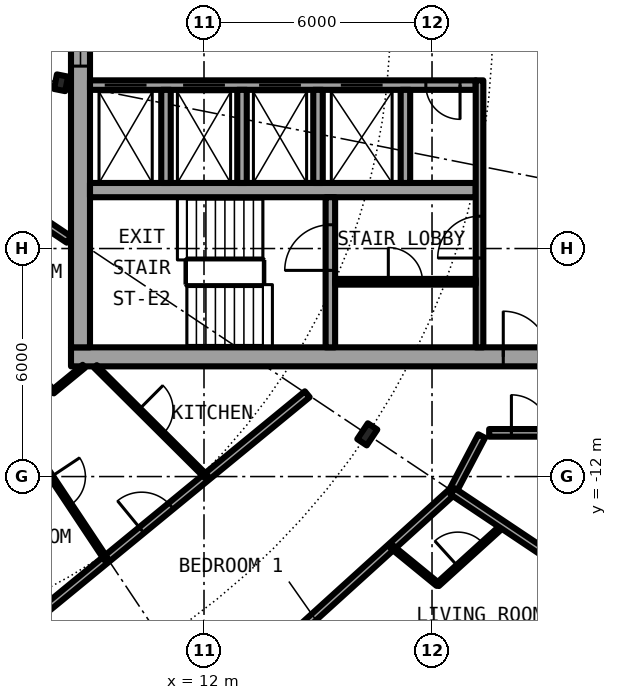
"""IFC4 building model, lengths in metres.
Left out: names, types, materials, properties, quantities, classifications, styles, units other than length and angle.
Written with IfcOpenShell. Run it as: python <this file> out.ifc"""

import sys

from ifc_helpers import new_model, si_unit, direction, frame, frame_2d, origin, origin_2d, place, context, subcontext, project, spatial, rectangle, i_section, extrude, element, fill, save


model = new_model("IFC4")
c1 = context("Model", 3, precision=1e-05, world=origin(), true_north=direction((0.0, 1.0)))
c2 = subcontext(c1, "Body", "Model", "MODEL_VIEW")
j1 = project(units=[si_unit("LENGTHUNIT", "METRE"), si_unit("PLANEANGLEUNIT", "RADIAN")], contexts=[c1])
p1 = place(None, origin())
s1 = spatial("IfcSite", under=j1, at=p1, CompositionType="ELEMENT")
p2 = place(p1, origin())
s2 = spatial("IfcBuilding", under=s1, at=p2, CompositionType="ELEMENT")
p3 = place(p2, frame((0.0, 0.0, 161.6)))
s3 = spatial("IfcBuildingStorey", under=s2, at=p3, CompositionType="ELEMENT", Elevation=161.6)
p4 = place(p3, frame((16.297, -10.889, 0.0), z_axis=(0.0, 0.0, 1.0), x_axis=(0.831469612303, -0.55557023302, 0.0)))
e1 = element("IfcColumn", 1, at=p4, inside=s3, PredefinedType="COLUMN", context=c2, shape_type="SweptSolid", body=[
    extrude(i_section(OverallWidth=0.3, OverallDepth=0.5, WebThickness=0.014, FlangeThickness=0.028, FilletRadius=0.027, at=origin_2d()), origin(), (0.0, 0.0, 1.0), 3.05),
])
p5 = place(p3, frame((8.239, -1.639, 0.0), z_axis=(0.0, 0.0, 1.0), x_axis=(0.980785280403, -0.195090322016, 0.0)))
e2 = element("IfcColumn", 2, at=p5, inside=s3, PredefinedType="COLUMN", context=c2, shape_type="SweptSolid", body=[
    extrude(i_section(OverallWidth=0.3, OverallDepth=0.39, WebThickness=0.011, FlangeThickness=0.019, FilletRadius=0.027, at=origin_2d()), origin(), (0.0, 0.0, 1.0), 3.05),
])
p6 = place(p3, frame((19.304, -19.304, 0.0), z_axis=(0.0, 0.0, 1.0), x_axis=(0.634382322723, 0.773019449054, 0.0)))
e3 = element("IfcWall", 3, at=p6, inside=s3, PredefinedType="SOLIDWALL", context=c2, shape_type="SweptSolid", body=[
    extrude(rectangle(XDim=5.352, YDim=0.25, at=frame_2d((2.676, 0.0))), origin(), (0.0, 0.0, 1.0), 2.7),
])
p7 = place(p6, frame((0.441, 0.0, 0.3)))
e4 = element("IfcOpeningElement", 4, at=p7, cuts=e3, PredefinedType="OPENING", context=c2, shape_type="SweptSolid", body=[
    extrude(rectangle(XDim=1.8, YDim=2.1, at=frame_2d((0.9, 1.05))), frame((0.0, 0.135, 0.0), z_axis=(0.0, -1.0, 0.0), x_axis=(1.0, 0.0, 0.0)), (0.0, 0.0, 1.0), 0.27),
])
p8 = place(p6, frame((3.51, 0.0, 0.0)))
e5 = element("IfcOpeningElement", 5, at=p8, cuts=e3, PredefinedType="OPENING", context=c2, shape_type="SweptSolid", body=[
    extrude(rectangle(XDim=1.0, YDim=2.2, at=frame_2d((0.5, 1.1))), frame((0.0, 0.135, 0.0), z_axis=(0.0, -1.0, 0.0), x_axis=(1.0, 0.0, 0.0)), (0.0, 0.0, 1.0), 0.27),
])
p9 = place(p3, frame((8.5, -8.85, 0.0), z_axis=(0.0, 0.0, 1.0), x_axis=(1.0, 0.0, 0.0)))
e6 = element("IfcWall", 6, at=p9, inside=s3, PredefinedType="SHEAR", context=c2, shape_type="SweptSolid", body=[
    extrude(rectangle(XDim=13.6, YDim=0.5, at=frame_2d((6.8, 0.0))), origin(), (0.0, 0.0, 1.0), 3.05),
])
p10 = place(p9, frame((11.375, 0.0, 0.0)))
e7 = element("IfcOpeningElement", 7, at=p10, cuts=e6, PredefinedType="OPENING", context=c2, shape_type="SweptSolid", body=[
    extrude(rectangle(XDim=1.2, YDim=2.3, at=frame_2d((0.6, 1.15))), frame((0.0, 0.26, 0.0), z_axis=(0.0, -1.0, 0.0), x_axis=(1.0, 0.0, 0.0)), (0.0, 0.0, 1.0), 0.52),
])
p11 = place(p3, frame((8.75, -8.6, 0.0), z_axis=(0.0, 0.0, 1.0), x_axis=(0.0, 1.0, 0.0)))
e8 = element("IfcWall", 8, at=p11, inside=s3, PredefinedType="SHEAR", context=c2, shape_type="SweptSolid", body=[
    extrude(rectangle(XDim=17.2, YDim=0.5, at=frame_2d((8.6, 0.0))), origin(), (0.0, 0.0, 1.0), 3.05),
])
p12 = place(p11, frame((7.4, 0.0, 0.1)))
e9 = element("IfcOpeningElement", 9, at=p12, cuts=e8, PredefinedType="OPENING", context=c2, shape_type="SweptSolid", body=[
    extrude(rectangle(XDim=2.4, YDim=2.2, at=frame_2d((1.2, 1.1))), frame((0.0, 0.26, 0.0), z_axis=(0.0, -1.0, 0.0), x_axis=(1.0, 0.0, 0.0)), (0.0, 0.0, 1.0), 0.52),
])
p13 = place(p3, frame((19.15, -1.7, 0.0), z_axis=(0.0, 0.0, 1.0), x_axis=(-1.0, 0.0, 0.0)))
e10 = element("IfcWall", 10, at=p13, inside=s3, PredefinedType="SHEAR", context=c2, shape_type="SweptSolid", body=[
    extrude(rectangle(XDim=10.15, YDim=0.25, at=frame_2d((5.075, 0.0))), origin(), (0.0, 0.0, 1.0), 3.05),
])
p14 = place(p13, frame((8.663, 0.0, 0.0)))
e11 = element("IfcOpeningElement", 11, at=p14, cuts=e10, PredefinedType="OPENING", context=c2, shape_type="SweptSolid", body=[
    extrude(rectangle(XDim=1.1, YDim=2.3, at=frame_2d((0.55, 1.15))), frame((0.0, 0.135, 0.0), z_axis=(0.0, -1.0, 0.0), x_axis=(1.0, 0.0, 0.0)), (0.0, 0.0, 1.0), 0.27),
])
p15 = place(p13, frame((6.6, 0.0, 0.0)))
e12 = element("IfcOpeningElement", 12, at=p15, cuts=e10, PredefinedType="OPENING", context=c2, shape_type="SweptSolid", body=[
    extrude(rectangle(XDim=1.1, YDim=2.3, at=frame_2d((0.55, 1.15))), frame((0.0, 0.135, 0.0), z_axis=(0.0, -1.0, 0.0), x_axis=(1.0, 0.0, 0.0)), (0.0, 0.0, 1.0), 0.27),
])
p16 = place(p13, frame((4.6, 0.0, 0.0)))
e13 = element("IfcOpeningElement", 13, at=p16, cuts=e10, PredefinedType="OPENING", context=c2, shape_type="SweptSolid", body=[
    extrude(rectangle(XDim=1.1, YDim=2.3, at=frame_2d((0.55, 1.15))), frame((0.0, 0.135, 0.0), z_axis=(0.0, -1.0, 0.0), x_axis=(1.0, 0.0, 0.0)), (0.0, 0.0, 1.0), 0.27),
])
p17 = place(p13, frame((2.45, 0.0, 0.0)))
e14 = element("IfcOpeningElement", 14, at=p17, cuts=e10, PredefinedType="OPENING", context=c2, shape_type="SweptSolid", body=[
    extrude(rectangle(XDim=1.1, YDim=2.3, at=frame_2d((0.55, 1.15))), frame((0.0, 0.135, 0.0), z_axis=(0.0, -1.0, 0.0), x_axis=(1.0, 0.0, 0.0)), (0.0, 0.0, 1.0), 0.27),
])
p18 = place(p13, frame((0.413, 0.0, 0.0)))
e15 = element("IfcOpeningElement", 15, at=p18, cuts=e10, PredefinedType="OPENING", context=c2, shape_type="SweptSolid", body=[
    extrude(rectangle(XDim=0.9, YDim=2.3, at=frame_2d((0.45, 1.15))), frame((0.0, 0.135, 0.0), z_axis=(0.0, -1.0, 0.0), x_axis=(1.0, 0.0, 0.0)), (0.0, 0.0, 1.0), 0.27),
])
p19 = place(p3, frame((9.0, -4.462, 0.0), z_axis=(0.0, 0.0, 1.0), x_axis=(1.0, 0.0, 0.0)))
e16 = element("IfcWall", 16, at=p19, inside=s3, PredefinedType="SHEAR", context=c2, shape_type="SweptSolid", body=[
    extrude(rectangle(XDim=10.15, YDim=0.375, at=frame_2d((5.075, 0.0))), origin(), (0.0, 0.0, 1.0), 3.05),
])
p20 = place(p3, frame((15.325, -8.6, 0.0), z_axis=(0.0, 0.0, 1.0), x_axis=(0.0, 1.0, 0.0)))
e17 = element("IfcWall", 17, at=p20, inside=s3, PredefinedType="SHEAR", context=c2, shape_type="SweptSolid", body=[
    extrude(rectangle(XDim=3.95, YDim=0.25, at=frame_2d((1.975, 0.0))), origin(), (0.0, 0.0, 1.0), 3.05),
])
p21 = place(p20, frame((2.025, 0.0, 0.0)))
e18 = element("IfcOpeningElement", 18, at=p21, cuts=e17, PredefinedType="OPENING", context=c2, shape_type="SweptSolid", body=[
    extrude(rectangle(XDim=1.2, YDim=2.3, at=frame_2d((0.6, 1.15))), frame((0.0, 0.135, 0.0), z_axis=(0.0, -1.0, 0.0), x_axis=(1.0, 0.0, 0.0)), (0.0, 0.0, 1.0), 0.27),
])
for number, where, z_axis, x_axis in (
    (19, (15.0, -1.825, 0.0), (0.0, 0.0, 1.0), (0.0, -1.0, 0.0)),
    (20, (17.3, -1.825, 0.0), (0.0, 0.0, 1.0), (0.0, -1.0, 0.0)),
):
    element("IfcWall", number, at=place(p3, frame(where, z_axis=z_axis, x_axis=x_axis)), inside=s3, PredefinedType="SOLIDWALL", context=c2, shape_type="SweptSolid", body=[
        extrude(rectangle(XDim=2.45, YDim=0.25, at=frame_2d((1.225, 0.0))), origin(), (0.0, 0.0, 1.0), 2.7),
    ])
p22 = place(p3, frame((19.25, -8.6, 0.0), z_axis=(0.0, 0.0, 1.0), x_axis=(0.0, 1.0, 0.0)))
e21 = element("IfcWall", 21, at=p22, inside=s3, PredefinedType="SOLIDWALL", context=c2, shape_type="SweptSolid", body=[
    extrude(rectangle(XDim=7.025, YDim=0.2, at=frame_2d((3.513, 0.0))), origin(), (0.0, 0.0, 1.0), 2.7),
])
p23 = place(p22, frame((2.35, 0.0, 0.0)))
e22 = element("IfcOpeningElement", 22, at=p23, cuts=e21, PredefinedType="OPENING", context=c2, shape_type="SweptSolid", body=[
    extrude(rectangle(XDim=1.1, YDim=2.3, at=frame_2d((0.55, 1.15))), frame((0.0, 0.11, 0.0), z_axis=(0.0, -1.0, 0.0), x_axis=(1.0, 0.0, 0.0)), (0.0, 0.0, 1.0), 0.22),
])
for number, where, z_axis, x_axis in (
    (23, (11.0, -1.825, 0.0), (0.0, 0.0, 1.0), (0.0, -1.0, 0.0)),
    (24, (13.0, -1.825, 0.0), (0.0, 0.0, 1.0), (0.0, -1.0, 0.0)),
):
    element("IfcWall", number, at=place(p3, frame(where, z_axis=z_axis, x_axis=x_axis)), inside=s3, PredefinedType="SOLIDWALL", context=c2, shape_type="SweptSolid", body=[
        extrude(rectangle(XDim=2.45, YDim=0.25, at=frame_2d((1.225, 0.0))), origin(), (0.0, 0.0, 1.0), 2.7),
    ])
p24 = place(p3, frame((15.45, -6.875, 0.0), z_axis=(0.0, 0.0, 1.0), x_axis=(1.0, 0.0, 0.0)))
e25 = element("IfcWall", 25, at=p24, inside=s3, PredefinedType="PARTITIONING", context=c2, shape_type="SweptSolid", body=[
    extrude(rectangle(XDim=3.7, YDim=0.15, at=frame_2d((1.85, 0.0))), origin(), (0.0, 0.0, 1.0), 2.7),
])
p25 = place(p24, frame((1.4, 0.0, 0.0)))
e26 = element("IfcOpeningElement", 26, at=p25, cuts=e25, PredefinedType="OPENING", context=c2, shape_type="SweptSolid", body=[
    extrude(rectangle(XDim=0.9, YDim=2.3, at=frame_2d((0.45, 1.15))), frame((0.0, 0.085, 0.0), z_axis=(0.0, -1.0, 0.0), x_axis=(1.0, 0.0, 0.0)), (0.0, 0.0, 1.0), 0.17),
])
p26 = place(p3, frame((18.147, -14.844, 0.0), z_axis=(0.0, 0.0, 1.0), x_axis=(0.741080073381, 0.671416655169, 0.0)))
e27 = element("IfcWall", 27, at=p26, inside=s3, PredefinedType="PARTITIONING", context=c2, shape_type="SweptSolid", body=[
    extrude(rectangle(XDim=2.323, YDim=0.1, at=frame_2d((1.162, 0.0))), origin(), (0.0, 0.0, 1.0), 2.7),
])
p27 = place(p26, frame((0.718, 0.0, 0.0)))
e28 = element("IfcOpeningElement", 28, at=p27, cuts=e27, PredefinedType="OPENING", context=c2, shape_type="SweptSolid", body=[
    extrude(rectangle(XDim=0.9, YDim=2.3, at=frame_2d((0.45, 1.15))), frame((0.0, 0.06, 0.0), z_axis=(0.0, -1.0, 0.0), x_axis=(1.0, 0.0, 0.0)), (0.0, 0.0, 1.0), 0.12),
])
p28 = place(p3, frame((18.542, -12.389, 0.0), z_axis=(0.0, 0.0, 1.0), x_axis=(0.465605550524, 0.884992356646, 0.0)))
e29 = element("IfcWall", 29, at=p28, inside=s3, PredefinedType="PARTITIONING", context=c2, shape_type="SweptSolid", body=[
    extrude(rectangle(XDim=1.643, YDim=0.2, at=frame_2d((0.821, 0.0))), origin(), (0.0, 0.0, 1.0), 2.7),
])
p29 = place(p3, frame((10.512, -19.667, 0.0), z_axis=(0.0, 0.0, 1.0), x_axis=(0.740947367223, 0.671563101283, 0.0)))
e30 = element("IfcWall", 30, at=p29, inside=s3, PredefinedType="PARTITIONING", context=c2, shape_type="SweptSolid", body=[
    extrude(rectangle(XDim=10.837, YDim=0.2, at=frame_2d((5.419, 0.0))), origin(), (0.0, 0.0, 1.0), 2.7),
])
p30 = place(p29, frame((3.835, 0.0, 0.0)))
e31 = element("IfcOpeningElement", 31, at=p30, cuts=e30, PredefinedType="OPENING", context=c2, shape_type="SweptSolid", body=[
    extrude(rectangle(XDim=1.0, YDim=2.3, at=frame_2d((0.5, 1.15))), frame((0.0, 0.11, 0.0), z_axis=(0.0, -1.0, 0.0), x_axis=(1.0, 0.0, 0.0)), (0.0, 0.0, 1.0), 0.22),
])
p31 = place(p3, frame((6.773, -16.353, 0.0), z_axis=(0.0, 0.0, 1.0), x_axis=(0.773034536097, 0.634363938131, 0.0)))
e32 = element("IfcWall", 32, at=p31, inside=s3, PredefinedType="PARTITIONING", context=c2, shape_type="SweptSolid", body=[
    extrude(rectangle(XDim=10.277, YDim=0.2, at=frame_2d((5.138, 0.0))), origin(), (0.0, 0.0, 1.0), 2.7),
])
p32 = place(p31, frame((4.638, 0.0, 0.0)))
e33 = element("IfcOpeningElement", 33, at=p32, cuts=e32, PredefinedType="OPENING", context=c2, shape_type="SweptSolid", body=[
    extrude(rectangle(XDim=1.0, YDim=2.3, at=frame_2d((0.5, 1.15))), frame((0.0, 0.11, 0.0), z_axis=(0.0, -1.0, 0.0), x_axis=(1.0, 0.0, 0.0)), (0.0, 0.0, 1.0), 0.22),
])
p33 = place(p3, frame((8.016, -9.773, 0.0), z_axis=(0.0, 0.0, 1.0), x_axis=(0.7731800648, 0.634186555673, 0.0)))
e34 = element("IfcWall", 34, at=p33, inside=s3, PredefinedType="PARTITIONING", context=c2, shape_type="SweptSolid", body=[
    extrude(rectangle(XDim=1.064, YDim=0.1, at=frame_2d((0.532, 0.0))), origin(), (0.0, 0.0, 1.0), 2.7),
])
p34 = place(p3, frame((19.504, -10.85, 0.0), z_axis=(0.0, 0.0, 1.0), x_axis=(1.0, 0.0, 0.0)))
e35 = element("IfcWall", 35, at=p34, inside=s3, PredefinedType="PARTITIONING", context=c2, shape_type="SweptSolid", body=[
    extrude(rectangle(XDim=2.171, YDim=0.2, at=frame_2d((1.085, 0.0))), origin(), (0.0, 0.0, 1.0), 2.7),
])
p35 = place(p34, frame((0.585, 0.0, 0.0)))
e36 = element("IfcOpeningElement", 36, at=p35, cuts=e35, PredefinedType="OPENING", context=c2, shape_type="SweptSolid", body=[
    extrude(rectangle(XDim=1.0, YDim=2.3, at=frame_2d((0.5, 1.15))), frame((0.0, 0.11, 0.0), z_axis=(0.0, -1.0, 0.0), x_axis=(1.0, 0.0, 0.0)), (0.0, 0.0, 1.0), 0.22),
])
p36 = place(p3, frame((6.513, -4.472, 0.0), z_axis=(0.0, 0.0, 1.0), x_axis=(0.83133816625, -0.555766905579, 0.0)))
e37 = element("IfcWall", 37, at=p36, inside=s3, PredefinedType="PARTITIONING", context=c2, shape_type="SweptSolid", body=[
    extrude(rectangle(XDim=2.323, YDim=0.2, at=frame_2d((1.162, 0.0))), origin(), (0.0, 0.0, 1.0), 2.7),
])
p37 = place(p3, frame((4.898, -5.968, 0.0), z_axis=(0.0, 0.0, 1.0), x_axis=(0.634401778971, -0.773003481776, 0.0)))
e38 = element("IfcWall", 38, at=p37, inside=s3, PredefinedType="PARTITIONING", context=c2, shape_type="SweptSolid", body=[
    extrude(rectangle(XDim=4.92, YDim=0.1, at=frame_2d((2.46, 0.0))), origin(), (0.0, 0.0, 1.0), 2.7),
])
p38 = place(p37, frame((2.01, 0.0, 0.0)))
e39 = element("IfcOpeningElement", 39, at=p38, cuts=e38, PredefinedType="OPENING", context=c2, shape_type="SweptSolid", body=[
    extrude(rectangle(XDim=0.9, YDim=2.3, at=frame_2d((0.45, 1.15))), frame((0.0, 0.06, 0.0), z_axis=(0.0, -1.0, 0.0), x_axis=(1.0, 0.0, 0.0)), (0.0, 0.0, 1.0), 0.12),
])
p39 = place(p3, frame((7.033, -10.581, 0.0), z_axis=(0.0, 0.0, 1.0), x_axis=(0.553865036342, -0.832606462573, 0.0)))
e40 = element("IfcWall", 40, at=p39, inside=s3, PredefinedType="PARTITIONING", context=c2, shape_type="SweptSolid", body=[
    extrude(rectangle(XDim=4.319, YDim=0.1, at=frame_2d((2.159, 0.0))), origin(), (0.0, 0.0, 1.0), 2.7),
])
p40 = place(p39, frame((1.709, 0.0, 0.0)))
e41 = element("IfcOpeningElement", 41, at=p40, cuts=e40, PredefinedType="OPENING", context=c2, shape_type="SweptSolid", body=[
    extrude(rectangle(XDim=0.9, YDim=2.3, at=frame_2d((0.45, 1.15))), frame((0.0, 0.06, 0.0), z_axis=(0.0, -1.0, 0.0), x_axis=(1.0, 0.0, 0.0)), (0.0, 0.0, 1.0), 0.12),
])
p41 = place(p3, frame((9.144, -9.104, 0.0), z_axis=(0.0, 0.0, 1.0), x_axis=(0.708793214553, -0.705416316088, 0.0)))
e42 = element("IfcWall", 42, at=p41, inside=s3, PredefinedType="PARTITIONING", context=c2, shape_type="SweptSolid", body=[
    extrude(rectangle(XDim=4.121, YDim=0.1, at=frame_2d((2.061, 0.0))), origin(), (0.0, 0.0, 1.0), 2.7),
])
p42 = place(p41, frame((1.611, 0.0, 0.0)))
e43 = element("IfcOpeningElement", 43, at=p42, cuts=e42, PredefinedType="OPENING", context=c2, shape_type="SweptSolid", body=[
    extrude(rectangle(XDim=0.9, YDim=2.3, at=frame_2d((0.45, 1.15))), frame((0.0, 0.06, 0.0), z_axis=(0.0, -1.0, 0.0), x_axis=(1.0, 0.0, 0.0)), (0.0, 0.0, 1.0), 0.12),
])
p43 = place(p3, frame((16.936, -13.845, 0.0), z_axis=(0.0, 0.0, 1.0), x_axis=(0.774283039722, -0.632839453889, 0.0)))
e44 = element("IfcWall", 44, at=p43, inside=s3, PredefinedType="PARTITIONING", context=c2, shape_type="SweptSolid", body=[
    extrude(rectangle(XDim=1.569, YDim=0.1, at=frame_2d((0.785, 0.0))), origin(), (0.0, 0.0, 1.0), 2.7),
])
p44 = place(p3, frame((18.542, -12.389, 0.0), z_axis=(0.0, 0.0, 1.0), x_axis=(0.831387096605, -0.55569370664, 0.0)))
e45 = element("IfcWall", 45, at=p44, inside=s3, PredefinedType="PARTITIONING", context=c2, shape_type="SweptSolid", body=[
    extrude(rectangle(XDim=4.875, YDim=0.2, at=frame_2d((2.438, 0.0))), origin(), (0.0, 0.0, 1.0), 2.7),
])
p45 = place(p14, origin())
e46 = element("IfcDoor", 46, at=p45, inside=s3, OperationType="DOUBLE_DOOR_SLIDING", PredefinedType="DOOR", context=c2, shape_type="SweptSolid", body=[
    extrude(rectangle(XDim=1.1, YDim=2.3, at=frame_2d((0.55, 1.15))), frame((0.0, 0.025, 0.0), z_axis=(0.0, -1.0, 0.0), x_axis=(1.0, 0.0, 0.0)), (0.0, 0.0, 1.0), 0.05),
])
fill(e11, e46)
p46 = place(p15, origin())
e47 = element("IfcDoor", 47, at=p46, inside=s3, OperationType="DOUBLE_DOOR_SLIDING", PredefinedType="DOOR", context=c2, shape_type="SweptSolid", body=[
    extrude(rectangle(XDim=1.1, YDim=2.3, at=frame_2d((0.55, 1.15))), frame((0.0, 0.025, 0.0), z_axis=(0.0, -1.0, 0.0), x_axis=(1.0, 0.0, 0.0)), (0.0, 0.0, 1.0), 0.05),
])
fill(e12, e47)
p47 = place(p16, origin())
e48 = element("IfcDoor", 48, at=p47, inside=s3, OperationType="DOUBLE_DOOR_SLIDING", PredefinedType="DOOR", context=c2, shape_type="SweptSolid", body=[
    extrude(rectangle(XDim=1.1, YDim=2.3, at=frame_2d((0.55, 1.15))), frame((0.0, 0.025, 0.0), z_axis=(0.0, -1.0, 0.0), x_axis=(1.0, 0.0, 0.0)), (0.0, 0.0, 1.0), 0.05),
])
fill(e13, e48)
p48 = place(p17, origin())
e49 = element("IfcDoor", 49, at=p48, inside=s3, OperationType="DOUBLE_DOOR_SLIDING", PredefinedType="DOOR", context=c2, shape_type="SweptSolid", body=[
    extrude(rectangle(XDim=1.1, YDim=2.3, at=frame_2d((0.55, 1.15))), frame((0.0, 0.025, 0.0), z_axis=(0.0, -1.0, 0.0), x_axis=(1.0, 0.0, 0.0)), (0.0, 0.0, 1.0), 0.05),
])
fill(e14, e49)
p49 = place(p18, origin())
e50 = element("IfcDoor", 50, at=p49, inside=s3, OperationType="SINGLE_SWING_RIGHT", PredefinedType="DOOR", context=c2, shape_type="SweptSolid", body=[
    extrude(rectangle(XDim=0.9, YDim=2.3, at=frame_2d((0.45, 1.15))), frame((0.0, 0.025, 0.0), z_axis=(0.0, -1.0, 0.0), x_axis=(1.0, 0.0, 0.0)), (0.0, 0.0, 1.0), 0.05),
])
fill(e15, e50)
p50 = place(p25, origin())
e51 = element("IfcDoor", 51, at=p50, inside=s3, OperationType="SINGLE_SWING_LEFT", PredefinedType="DOOR", context=c2, shape_type="SweptSolid", body=[
    extrude(rectangle(XDim=0.9, YDim=2.3, at=frame_2d((0.45, 1.15))), frame((0.0, 0.025, 0.0), z_axis=(0.0, -1.0, 0.0), x_axis=(1.0, 0.0, 0.0)), (0.0, 0.0, 1.0), 0.05),
])
fill(e26, e51)
p51 = place(p21, origin())
e52 = element("IfcDoor", 52, at=p51, inside=s3, OperationType="SINGLE_SWING_LEFT", PredefinedType="DOOR", context=c2, shape_type="SweptSolid", body=[
    extrude(rectangle(XDim=1.2, YDim=2.3, at=frame_2d((0.6, 1.15))), frame((0.0, 0.025, 0.0), z_axis=(0.0, -1.0, 0.0), x_axis=(1.0, 0.0, 0.0)), (0.0, 0.0, 1.0), 0.05),
])
fill(e18, e52)
p52 = place(p23, origin())
e53 = element("IfcDoor", 53, at=p52, inside=s3, OperationType="SINGLE_SWING_RIGHT", PredefinedType="DOOR", context=c2, shape_type="SweptSolid", body=[
    extrude(rectangle(XDim=1.1, YDim=2.3, at=frame_2d((0.55, 1.15))), frame((0.0, 0.025, 0.0), z_axis=(0.0, -1.0, 0.0), x_axis=(1.0, 0.0, 0.0)), (0.0, 0.0, 1.0), 0.05),
])
fill(e22, e53)
p53 = place(p10, origin())
e54 = element("IfcDoor", 54, at=p53, inside=s3, OperationType="SINGLE_SWING_LEFT", PredefinedType="DOOR", context=c2, shape_type="SweptSolid", body=[
    extrude(rectangle(XDim=1.2, YDim=2.3, at=frame_2d((0.6, 1.15))), frame((0.0, 0.025, 0.0), z_axis=(0.0, -1.0, 0.0), x_axis=(1.0, 0.0, 0.0)), (0.0, 0.0, 1.0), 0.05),
])
fill(e7, e54)
p54 = place(p12, origin())
e55 = element("IfcWindow", 55, at=p54, inside=s3, PartitioningType="SINGLE_PANEL", PredefinedType="WINDOW", context=c2, shape_type="SweptSolid", body=[
    extrude(rectangle(XDim=2.4, YDim=2.2, at=frame_2d((1.2, 1.1))), frame((0.0, 0.03, 0.0), z_axis=(0.0, -1.0, 0.0), x_axis=(1.0, 0.0, 0.0)), (0.0, 0.0, 1.0), 0.06),
])
fill(e9, e55)
p55 = place(p27, origin())
e56 = element("IfcDoor", 56, at=p55, inside=s3, OperationType="SINGLE_SWING_RIGHT", PredefinedType="DOOR", context=c2, shape_type="SweptSolid", body=[
    extrude(rectangle(XDim=0.9, YDim=2.3, at=frame_2d((0.45, 1.15))), frame((0.0, 0.025, 0.0), z_axis=(0.0, -1.0, 0.0), x_axis=(1.0, 0.0, 0.0)), (0.0, 0.0, 1.0), 0.05),
])
fill(e28, e56)
p56 = place(p32, origin())
e57 = element("IfcDoor", 57, at=p56, inside=s3, OperationType="SINGLE_SWING_RIGHT", PredefinedType="DOOR", context=c2, shape_type="SweptSolid", body=[
    extrude(rectangle(XDim=1.0, YDim=2.3, at=frame_2d((0.5, 1.15))), frame((0.0, 0.025, 0.0), z_axis=(0.0, -1.0, 0.0), x_axis=(1.0, 0.0, 0.0)), (0.0, 0.0, 1.0), 0.05),
])
fill(e33, e57)
p57 = place(p40, origin())
e58 = element("IfcDoor", 58, at=p57, inside=s3, OperationType="SINGLE_SWING_RIGHT", PredefinedType="DOOR", context=c2, shape_type="SweptSolid", body=[
    extrude(rectangle(XDim=0.9, YDim=2.3, at=frame_2d((0.45, 1.15))), frame((0.0, 0.025, 0.0), z_axis=(0.0, -1.0, 0.0), x_axis=(1.0, 0.0, 0.0)), (0.0, 0.0, 1.0), 0.05),
])
fill(e41, e58)
p58 = place(p42, origin())
e59 = element("IfcDoor", 59, at=p58, inside=s3, OperationType="SINGLE_SWING_RIGHT", PredefinedType="DOOR", context=c2, shape_type="SweptSolid", body=[
    extrude(rectangle(XDim=0.9, YDim=2.3, at=frame_2d((0.45, 1.15))), frame((0.0, 0.025, 0.0), z_axis=(0.0, -1.0, 0.0), x_axis=(1.0, 0.0, 0.0)), (0.0, 0.0, 1.0), 0.05),
])
fill(e43, e59)
p59 = place(p35, origin())
e60 = element("IfcDoor", 60, at=p59, inside=s3, OperationType="SINGLE_SWING_LEFT", PredefinedType="DOOR", context=c2, shape_type="SweptSolid", body=[
    extrude(rectangle(XDim=1.0, YDim=2.3, at=frame_2d((0.5, 1.15))), frame((0.0, 0.025, 0.0), z_axis=(0.0, -1.0, 0.0), x_axis=(1.0, 0.0, 0.0)), (0.0, 0.0, 1.0), 0.05),
])
fill(e36, e60)
save(model, sys.argv[1])
